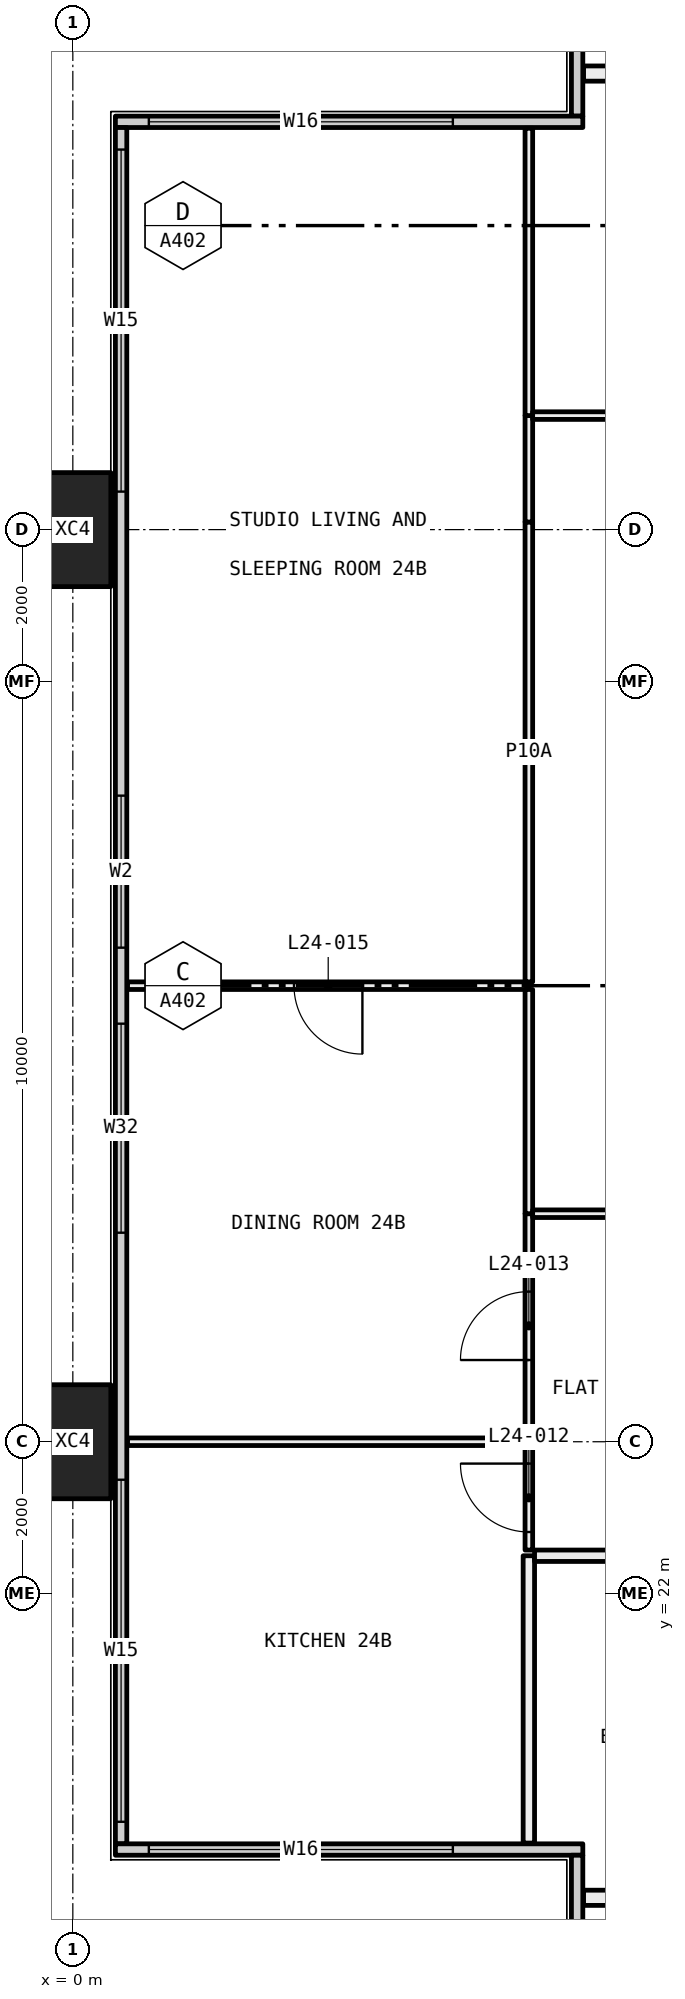
"""IFC4 building model, lengths in metres.
Left out: names, types, materials, properties, quantities, classifications, styles, units other than length and angle.
Written with IfcOpenShell. Run it as: python <this file> out.ifc"""

import sys

from ifc_helpers import new_model, si_unit, direction, frame, frame_2d, origin, origin_2d, place, context, subcontext, project, spatial, rectangle, hollow_rectangle, extrude, element, fill, save


model = new_model("IFC4")
c1 = context("Model", 3, precision=1e-05, world=origin(), true_north=direction((0.0, 1.0)))
c2 = subcontext(c1, "Body", "Model", "MODEL_VIEW")
j1 = project(units=[si_unit("LENGTHUNIT", "METRE"), si_unit("PLANEANGLEUNIT", "RADIAN")], contexts=[c1])
p1 = place(None, origin())
s1 = spatial("IfcSite", under=j1, at=p1, CompositionType="ELEMENT")
p2 = place(p1, origin())
s2 = spatial("IfcBuilding", under=s1, at=p2, CompositionType="ELEMENT")
p3 = place(p2, frame((0.0, 0.0, 96.6)))
s3 = spatial("IfcBuildingStorey", under=s2, at=p3, CompositionType="ELEMENT", Elevation=96.6)
for number, where, z_axis, x_axis in (
    (1, (0.0, 24.0, -0.4), (0.0, 0.0, 1.0), (0.0, 1.0, 0.0)),
    (2, (0.0, 36.0, -0.4), (0.0, 0.0, 1.0), (0.0, 1.0, 0.0)),
):
    element("IfcColumn", number, at=place(p3, frame(where, z_axis=z_axis, x_axis=x_axis)), inside=s3, PredefinedType="COLUMN", context=c2, shape_type="SweptSolid", body=[
        extrude(hollow_rectangle(XDim=1.5, YDim=1.0, WallThickness=0.06, at=origin_2d()), origin(), (0.0, 0.0, 1.0), 3.45),
    ])
p4 = place(p3, frame((6.635, 41.44, 0.0), z_axis=(0.0, 0.0, 1.0), x_axis=(0.0, 1.0, 0.0)))
e3 = element("IfcWall", 3, at=p4, inside=s3, PredefinedType="ELEMENTEDWALL", context=c2, shape_type="SweptSolid", body=[
    extrude(rectangle(XDim=5.85, YDim=0.15, at=frame_2d((2.925, 0.0))), origin(), (0.0, 0.0, 1.0), 3.05),
])
p5 = place(p4, frame((1.56, 0.0, 0.45)))
e4 = element("IfcOpeningElement", 4, at=p5, cuts=e3, PredefinedType="OPENING", context=c2, shape_type="SweptSolid", body=[
    extrude(rectangle(XDim=4.0, YDim=2.55, at=frame_2d((2.0, 1.275))), frame((0.0, 0.085, 0.0), z_axis=(0.0, -1.0, 0.0), x_axis=(1.0, 0.0, 0.0)), (0.0, 0.0, 1.0), 0.17),
])
p6 = place(p3, frame((0.56, 41.365, 0.0), z_axis=(0.0, 0.0, 1.0), x_axis=(1.0, 0.0, 0.0)))
e5 = element("IfcWall", 5, at=p6, inside=s3, PredefinedType="ELEMENTEDWALL", context=c2, shape_type="SweptSolid", body=[
    extrude(rectangle(XDim=6.15, YDim=0.15, at=frame_2d((3.075, 0.0))), origin(), (0.0, 0.0, 1.0), 3.05),
])
p7 = place(p6, frame((0.44, 0.0, 0.45)))
e6 = element("IfcOpeningElement", 6, at=p7, cuts=e5, PredefinedType="OPENING", context=c2, shape_type="SweptSolid", body=[
    extrude(rectangle(XDim=4.0, YDim=2.55, at=frame_2d((2.0, 1.275))), frame((0.0, 0.085, 0.0), z_axis=(0.0, -1.0, 0.0), x_axis=(1.0, 0.0, 0.0)), (0.0, 0.0, 1.0), 0.17),
])
p8 = place(p3, frame((0.635, 18.71, 0.0), z_axis=(0.0, 0.0, 1.0), x_axis=(0.0, 1.0, 0.0)))
e7 = element("IfcWall", 7, at=p8, inside=s3, PredefinedType="ELEMENTEDWALL", context=c2, shape_type="SweptSolid", body=[
    extrude(rectangle(XDim=22.58, YDim=0.15, at=frame_2d((11.29, 0.0))), origin(), (0.0, 0.0, 1.0), 3.05),
])
p9 = place(p8, frame((0.29, 0.0, 0.45)))
e8 = element("IfcOpeningElement", 8, at=p9, cuts=e7, PredefinedType="OPENING", context=c2, shape_type="SweptSolid", body=[
    extrude(rectangle(XDim=4.5, YDim=2.55, at=frame_2d((2.25, 1.275))), frame((0.0, 0.085, 0.0), z_axis=(0.0, -1.0, 0.0), x_axis=(1.0, 0.0, 0.0)), (0.0, 0.0, 1.0), 0.17),
])
p10 = place(p8, frame((8.04, 0.0, 0.45)))
e9 = element("IfcOpeningElement", 9, at=p10, cuts=e7, PredefinedType="OPENING", context=c2, shape_type="SweptSolid", body=[
    extrude(rectangle(XDim=2.75, YDim=2.55, at=frame_2d((1.375, 1.275))), frame((0.0, 0.085, 0.0), z_axis=(0.0, -1.0, 0.0), x_axis=(1.0, 0.0, 0.0)), (0.0, 0.0, 1.0), 0.17),
])
p11 = place(p8, frame((11.79, 0.0, 0.45)))
e10 = element("IfcOpeningElement", 10, at=p11, cuts=e7, PredefinedType="OPENING", context=c2, shape_type="SweptSolid", body=[
    extrude(rectangle(XDim=2.0, YDim=2.55, at=frame_2d((1.0, 1.275))), frame((0.0, 0.085, 0.0), z_axis=(0.0, -1.0, 0.0), x_axis=(1.0, 0.0, 0.0)), (0.0, 0.0, 1.0), 0.17),
])
p12 = place(p8, frame((17.79, 0.0, 0.45)))
e11 = element("IfcOpeningElement", 11, at=p12, cuts=e7, PredefinedType="OPENING", context=c2, shape_type="SweptSolid", body=[
    extrude(rectangle(XDim=4.5, YDim=2.55, at=frame_2d((2.25, 1.275))), frame((0.0, 0.085, 0.0), z_axis=(0.0, -1.0, 0.0), x_axis=(1.0, 0.0, 0.0)), (0.0, 0.0, 1.0), 0.17),
])
p13 = place(p3, frame((0.56, 18.635, 0.0), z_axis=(0.0, 0.0, 1.0), x_axis=(1.0, 0.0, 0.0)))
e12 = element("IfcWall", 12, at=p13, inside=s3, PredefinedType="ELEMENTEDWALL", context=c2, shape_type="SweptSolid", body=[
    extrude(rectangle(XDim=6.15, YDim=0.15, at=frame_2d((3.075, 0.0))), origin(), (0.0, 0.0, 1.0), 3.05),
])
p14 = place(p13, frame((0.44, 0.0, 0.45)))
e13 = element("IfcOpeningElement", 13, at=p14, cuts=e12, PredefinedType="OPENING", context=c2, shape_type="SweptSolid", body=[
    extrude(rectangle(XDim=4.0, YDim=2.55, at=frame_2d((2.0, 1.275))), frame((0.0, 0.085, 0.0), z_axis=(0.0, -1.0, 0.0), x_axis=(1.0, 0.0, 0.0)), (0.0, 0.0, 1.0), 0.17),
])
p15 = place(p3, frame((6.635, 12.71, 0.0), z_axis=(0.0, 0.0, 1.0), x_axis=(0.0, 1.0, 0.0)))
e14 = element("IfcWall", 14, at=p15, inside=s3, PredefinedType="ELEMENTEDWALL", context=c2, shape_type="SweptSolid", body=[
    extrude(rectangle(XDim=5.85, YDim=0.15, at=frame_2d((2.925, 0.0))), origin(), (0.0, 0.0, 1.0), 3.05),
])
p16 = place(p15, frame((0.29, 0.0, 0.45)))
e15 = element("IfcOpeningElement", 15, at=p16, cuts=e14, PredefinedType="OPENING", context=c2, shape_type="SweptSolid", body=[
    extrude(rectangle(XDim=4.0, YDim=2.55, at=frame_2d((2.0, 1.275))), frame((0.0, 0.085, 0.0), z_axis=(0.0, -1.0, 0.0), x_axis=(1.0, 0.0, 0.0)), (0.0, 0.0, 1.0), 0.17),
])
p17 = place(p3, frame((10.1, 18.0, 0.0), z_axis=(0.0, 0.0, 1.0), x_axis=(-1.0, 0.0, 0.0)))
e16 = element("IfcWall", 16, at=p17, inside=s3, PredefinedType="PARTITIONING", context=c2, shape_type="SweptSolid", body=[
    extrude(rectangle(XDim=3.38, YDim=0.2, at=frame_2d((1.69, 0.0))), origin(), (0.0, 0.0, 1.0), 3.05),
])
p18 = place(p3, frame((6.0, 24.0, 0.0), z_axis=(0.0, 0.0, 1.0), x_axis=(-1.0, 0.0, 0.0)))
e17 = element("IfcWall", 17, at=p18, inside=s3, PredefinedType="PARTITIONING", context=c2, shape_type="SweptSolid", body=[
    extrude(rectangle(XDim=5.28, YDim=0.1, at=frame_2d((2.64, 0.0))), origin(), (0.0, 0.0, 1.0), 2.45),
])
p19 = place(p3, frame((6.0, 18.72, 0.0), z_axis=(0.0, 0.0, 1.0), x_axis=(0.0, 1.0, 0.0)))
e18 = element("IfcWall", 18, at=p19, inside=s3, PredefinedType="PARTITIONING", context=c2, shape_type="SweptSolid", body=[
    extrude(rectangle(XDim=3.78, YDim=0.15, at=frame_2d((1.89, 0.0))), origin(), (0.0, 0.0, 1.0), 3.05),
])
p20 = place(p3, frame((6.0, 22.575, 0.0), z_axis=(0.0, 0.0, 1.0), x_axis=(0.0, 1.0, 0.0)))
e19 = element("IfcWall", 19, at=p20, inside=s3, PredefinedType="PARTITIONING", context=c2, shape_type="SweptSolid", body=[
    extrude(rectangle(XDim=1.375, YDim=0.1, at=frame_2d((0.688, 0.0))), origin(), (0.0, 0.0, 1.0), 2.45),
])
p21 = place(p20, frame((0.238, 0.0, 0.0)))
e20 = element("IfcOpeningElement", 20, at=p21, cuts=e19, PredefinedType="OPENING", context=c2, shape_type="SweptSolid", body=[
    extrude(rectangle(XDim=0.9, YDim=2.1, at=frame_2d((0.45, 1.05))), frame((0.0, 0.06, 0.0), z_axis=(0.0, -1.0, 0.0), x_axis=(1.0, 0.0, 0.0)), (0.0, 0.0, 1.0), 0.12),
])
p22 = place(p3, frame((6.0, 30.0, 0.0), z_axis=(0.0, 0.0, 1.0), x_axis=(-1.0, 0.0, 0.0)))
e21 = element("IfcWall", 21, at=p22, inside=s3, PredefinedType="PARTITIONING", context=c2, shape_type="SweptSolid", body=[
    extrude(rectangle(XDim=5.28, YDim=0.1, at=frame_2d((2.64, 0.0))), origin(), (0.0, 0.0, 1.0), 3.05),
])
p23 = place(p22, frame((2.19, 0.0, 0.0)))
e22 = element("IfcOpeningElement", 22, at=p23, cuts=e21, PredefinedType="OPENING", context=c2, shape_type="SweptSolid", body=[
    extrude(rectangle(XDim=0.9, YDim=2.1, at=frame_2d((0.45, 1.05))), frame((0.0, 0.06, 0.0), z_axis=(0.0, -1.0, 0.0), x_axis=(1.0, 0.0, 0.0)), (0.0, 0.0, 1.0), 0.12),
])
p24 = place(p3, frame((6.0, 24.05, 0.0), z_axis=(0.0, 0.0, 1.0), x_axis=(0.0, 1.0, 0.0)))
e23 = element("IfcWall", 23, at=p24, inside=s3, PredefinedType="PARTITIONING", context=c2, shape_type="SweptSolid", body=[
    extrude(rectangle(XDim=2.95, YDim=0.1, at=frame_2d((1.475, 0.0))), origin(), (0.0, 0.0, 1.0), 2.45),
])
p25 = place(p24, frame((1.025, 0.0, 0.0)))
e24 = element("IfcOpeningElement", 24, at=p25, cuts=e23, PredefinedType="OPENING", context=c2, shape_type="SweptSolid", body=[
    extrude(rectangle(XDim=0.9, YDim=2.1, at=frame_2d((0.45, 1.05))), frame((0.0, 0.06, 0.0), z_axis=(0.0, -1.0, 0.0), x_axis=(1.0, 0.0, 0.0)), (0.0, 0.0, 1.0), 0.12),
])
p26 = place(p3, frame((6.0, 27.0, 0.0), z_axis=(0.0, 0.0, 1.0), x_axis=(0.0, 1.0, 0.0)))
e25 = element("IfcWall", 25, at=p26, inside=s3, PredefinedType="PARTITIONING", context=c2, shape_type="SweptSolid", body=[
    extrude(rectangle(XDim=2.95, YDim=0.1, at=frame_2d((1.475, 0.0))), origin(), (0.0, 0.0, 1.0), 3.05),
])
p27 = place(p3, frame((6.0, 30.05, 0.0), z_axis=(0.0, 0.0, 1.0), x_axis=(0.0, 1.0, 0.0)))
e26 = element("IfcWall", 26, at=p27, inside=s3, PredefinedType="PARTITIONING", context=c2, shape_type="SweptSolid", body=[
    extrude(rectangle(XDim=6.05, YDim=0.1, at=frame_2d((3.025, 0.0))), origin(), (0.0, 0.0, 1.0), 2.45),
])
p28 = place(p3, frame((6.0, 36.1, 0.0), z_axis=(0.0, 0.0, 1.0), x_axis=(0.0, 1.0, 0.0)))
e27 = element("IfcWall", 27, at=p28, inside=s3, PredefinedType="PARTITIONING", context=c2, shape_type="SweptSolid", body=[
    extrude(rectangle(XDim=1.4, YDim=0.1, at=frame_2d((0.7, 0.0))), origin(), (0.0, 0.0, 1.0), 3.05),
])
p29 = place(p3, frame((6.0, 37.5, 0.0), z_axis=(0.0, 0.0, 1.0), x_axis=(0.0, 1.0, 0.0)))
e28 = element("IfcWall", 28, at=p29, inside=s3, PredefinedType="PARTITIONING", context=c2, shape_type="SweptSolid", body=[
    extrude(rectangle(XDim=3.78, YDim=0.1, at=frame_2d((1.89, 0.0))), origin(), (0.0, 0.0, 1.0), 3.05),
])
p30 = place(p3, frame((10.0, 22.5, 0.0), z_axis=(0.0, 0.0, 1.0), x_axis=(-1.0, 0.0, 0.0)))
e29 = element("IfcWall", 29, at=p30, inside=s3, PredefinedType="PARTITIONING", context=c2, shape_type="SweptSolid", body=[
    extrude(rectangle(XDim=3.925, YDim=0.15, at=frame_2d((1.962, 0.0))), origin(), (0.0, 0.0, 1.0), 3.05),
])
p31 = place(p30, frame((1.512, 0.0, 0.0)))
e30 = element("IfcOpeningElement", 30, at=p31, cuts=e29, PredefinedType="OPENING", context=c2, shape_type="SweptSolid", body=[
    extrude(rectangle(XDim=0.9, YDim=2.1, at=frame_2d((0.45, 1.05))), frame((0.0, 0.085, 0.0), z_axis=(0.0, -1.0, 0.0), x_axis=(1.0, 0.0, 0.0)), (0.0, 0.0, 1.0), 0.17),
])
p32 = place(p3, frame((10.0, 27.0, 0.0), z_axis=(0.0, 0.0, 1.0), x_axis=(-1.0, 0.0, 0.0)))
e31 = element("IfcWall", 31, at=p32, inside=s3, PredefinedType="PARTITIONING", context=c2, shape_type="SweptSolid", body=[
    extrude(rectangle(XDim=3.95, YDim=0.1, at=frame_2d((1.975, 0.0))), origin(), (0.0, 0.0, 1.0), 3.05),
])
p33 = place(p32, frame((1.525, 0.0, 0.0)))
e32 = element("IfcOpeningElement", 32, at=p33, cuts=e31, PredefinedType="OPENING", context=c2, shape_type="SweptSolid", body=[
    extrude(rectangle(XDim=0.9, YDim=2.1, at=frame_2d((0.45, 1.05))), frame((0.0, 0.06, 0.0), z_axis=(0.0, -1.0, 0.0), x_axis=(1.0, 0.0, 0.0)), (0.0, 0.0, 1.0), 0.12),
])
p34 = place(p3, frame((10.0, 37.5, 0.0), z_axis=(0.0, 0.0, 1.0), x_axis=(-1.0, 0.0, 0.0)))
e33 = element("IfcWall", 33, at=p34, inside=s3, PredefinedType="PARTITIONING", context=c2, shape_type="SweptSolid", body=[
    extrude(rectangle(XDim=3.95, YDim=0.1, at=frame_2d((1.975, 0.0))), origin(), (0.0, 0.0, 1.0), 3.05),
])
p35 = place(p34, frame((1.525, 0.0, 0.0)))
e34 = element("IfcOpeningElement", 34, at=p35, cuts=e33, PredefinedType="OPENING", context=c2, shape_type="SweptSolid", body=[
    extrude(rectangle(XDim=0.9, YDim=2.1, at=frame_2d((0.45, 1.05))), frame((0.0, 0.06, 0.0), z_axis=(0.0, -1.0, 0.0), x_axis=(1.0, 0.0, 0.0)), (0.0, 0.0, 1.0), 0.12),
])
p36 = place(p3, frame((10.1, 42.0, 0.0), z_axis=(0.0, 0.0, 1.0), x_axis=(-1.0, 0.0, 0.0)))
e35 = element("IfcWall", 35, at=p36, inside=s3, PredefinedType="PARTITIONING", context=c2, shape_type="SweptSolid", body=[
    extrude(rectangle(XDim=3.38, YDim=0.2, at=frame_2d((1.69, 0.0))), origin(), (0.0, 0.0, 1.0), 3.05),
])
p37 = place(p7, origin())
e36 = element("IfcWindow", 36, at=p37, inside=s3, PartitioningType="SINGLE_PANEL", PredefinedType="WINDOW", context=c2, shape_type="SweptSolid", body=[
    extrude(rectangle(XDim=4.0, YDim=2.55, at=frame_2d((2.0, 1.275))), frame((0.0, 0.03, 0.0), z_axis=(0.0, -1.0, 0.0), x_axis=(1.0, 0.0, 0.0)), (0.0, 0.0, 1.0), 0.06),
])
fill(e6, e36)
p38 = place(p9, origin())
e37 = element("IfcWindow", 37, at=p38, inside=s3, PartitioningType="SINGLE_PANEL", PredefinedType="WINDOW", context=c2, shape_type="SweptSolid", body=[
    extrude(rectangle(XDim=4.5, YDim=2.55, at=frame_2d((2.25, 1.275))), frame((0.0, 0.03, 0.0), z_axis=(0.0, -1.0, 0.0), x_axis=(1.0, 0.0, 0.0)), (0.0, 0.0, 1.0), 0.06),
])
fill(e8, e37)
p39 = place(p10, origin())
e38 = element("IfcWindow", 38, at=p39, inside=s3, PartitioningType="SINGLE_PANEL", PredefinedType="WINDOW", context=c2, shape_type="SweptSolid", body=[
    extrude(rectangle(XDim=2.75, YDim=2.55, at=frame_2d((1.375, 1.275))), frame((0.0, 0.03, 0.0), z_axis=(0.0, -1.0, 0.0), x_axis=(1.0, 0.0, 0.0)), (0.0, 0.0, 1.0), 0.06),
])
fill(e9, e38)
p40 = place(p11, origin())
e39 = element("IfcWindow", 39, at=p40, inside=s3, PartitioningType="SINGLE_PANEL", PredefinedType="WINDOW", context=c2, shape_type="SweptSolid", body=[
    extrude(rectangle(XDim=2.0, YDim=2.55, at=frame_2d((1.0, 1.275))), frame((0.0, 0.03, 0.0), z_axis=(0.0, -1.0, 0.0), x_axis=(1.0, 0.0, 0.0)), (0.0, 0.0, 1.0), 0.06),
])
fill(e10, e39)
p41 = place(p12, origin())
e40 = element("IfcWindow", 40, at=p41, inside=s3, PartitioningType="SINGLE_PANEL", PredefinedType="WINDOW", context=c2, shape_type="SweptSolid", body=[
    extrude(rectangle(XDim=4.5, YDim=2.55, at=frame_2d((2.25, 1.275))), frame((0.0, 0.03, 0.0), z_axis=(0.0, -1.0, 0.0), x_axis=(1.0, 0.0, 0.0)), (0.0, 0.0, 1.0), 0.06),
])
fill(e11, e40)
p42 = place(p14, origin())
e41 = element("IfcWindow", 41, at=p42, inside=s3, PartitioningType="SINGLE_PANEL", PredefinedType="WINDOW", context=c2, shape_type="SweptSolid", body=[
    extrude(rectangle(XDim=4.0, YDim=2.55, at=frame_2d((2.0, 1.275))), frame((0.0, 0.03, 0.0), z_axis=(0.0, -1.0, 0.0), x_axis=(1.0, 0.0, 0.0)), (0.0, 0.0, 1.0), 0.06),
])
fill(e13, e41)
p43 = place(p21, origin())
e42 = element("IfcDoor", 42, at=p43, inside=s3, OperationType="SINGLE_SWING_LEFT", PredefinedType="DOOR", context=c2, shape_type="SweptSolid", body=[
    extrude(rectangle(XDim=0.9, YDim=2.1, at=frame_2d((0.45, 1.05))), frame((0.0, 0.025, 0.0), z_axis=(0.0, -1.0, 0.0), x_axis=(1.0, 0.0, 0.0)), (0.0, 0.0, 1.0), 0.05),
])
fill(e20, e42)
p44 = place(p25, origin())
e43 = element("IfcDoor", 43, at=p44, inside=s3, OperationType="SINGLE_SWING_RIGHT", PredefinedType="DOOR", context=c2, shape_type="SweptSolid", body=[
    extrude(rectangle(XDim=0.9, YDim=2.1, at=frame_2d((0.45, 1.05))), frame((0.0, 0.025, 0.0), z_axis=(0.0, -1.0, 0.0), x_axis=(1.0, 0.0, 0.0)), (0.0, 0.0, 1.0), 0.05),
])
fill(e24, e43)
p45 = place(p23, origin())
e44 = element("IfcDoor", 44, at=p45, inside=s3, OperationType="SINGLE_SWING_RIGHT", PredefinedType="DOOR", context=c2, shape_type="SweptSolid", body=[
    extrude(rectangle(XDim=0.9, YDim=2.1, at=frame_2d((0.45, 1.05))), frame((0.0, 0.025, 0.0), z_axis=(0.0, -1.0, 0.0), x_axis=(1.0, 0.0, 0.0)), (0.0, 0.0, 1.0), 0.05),
])
fill(e22, e44)
save(model, sys.argv[1])
